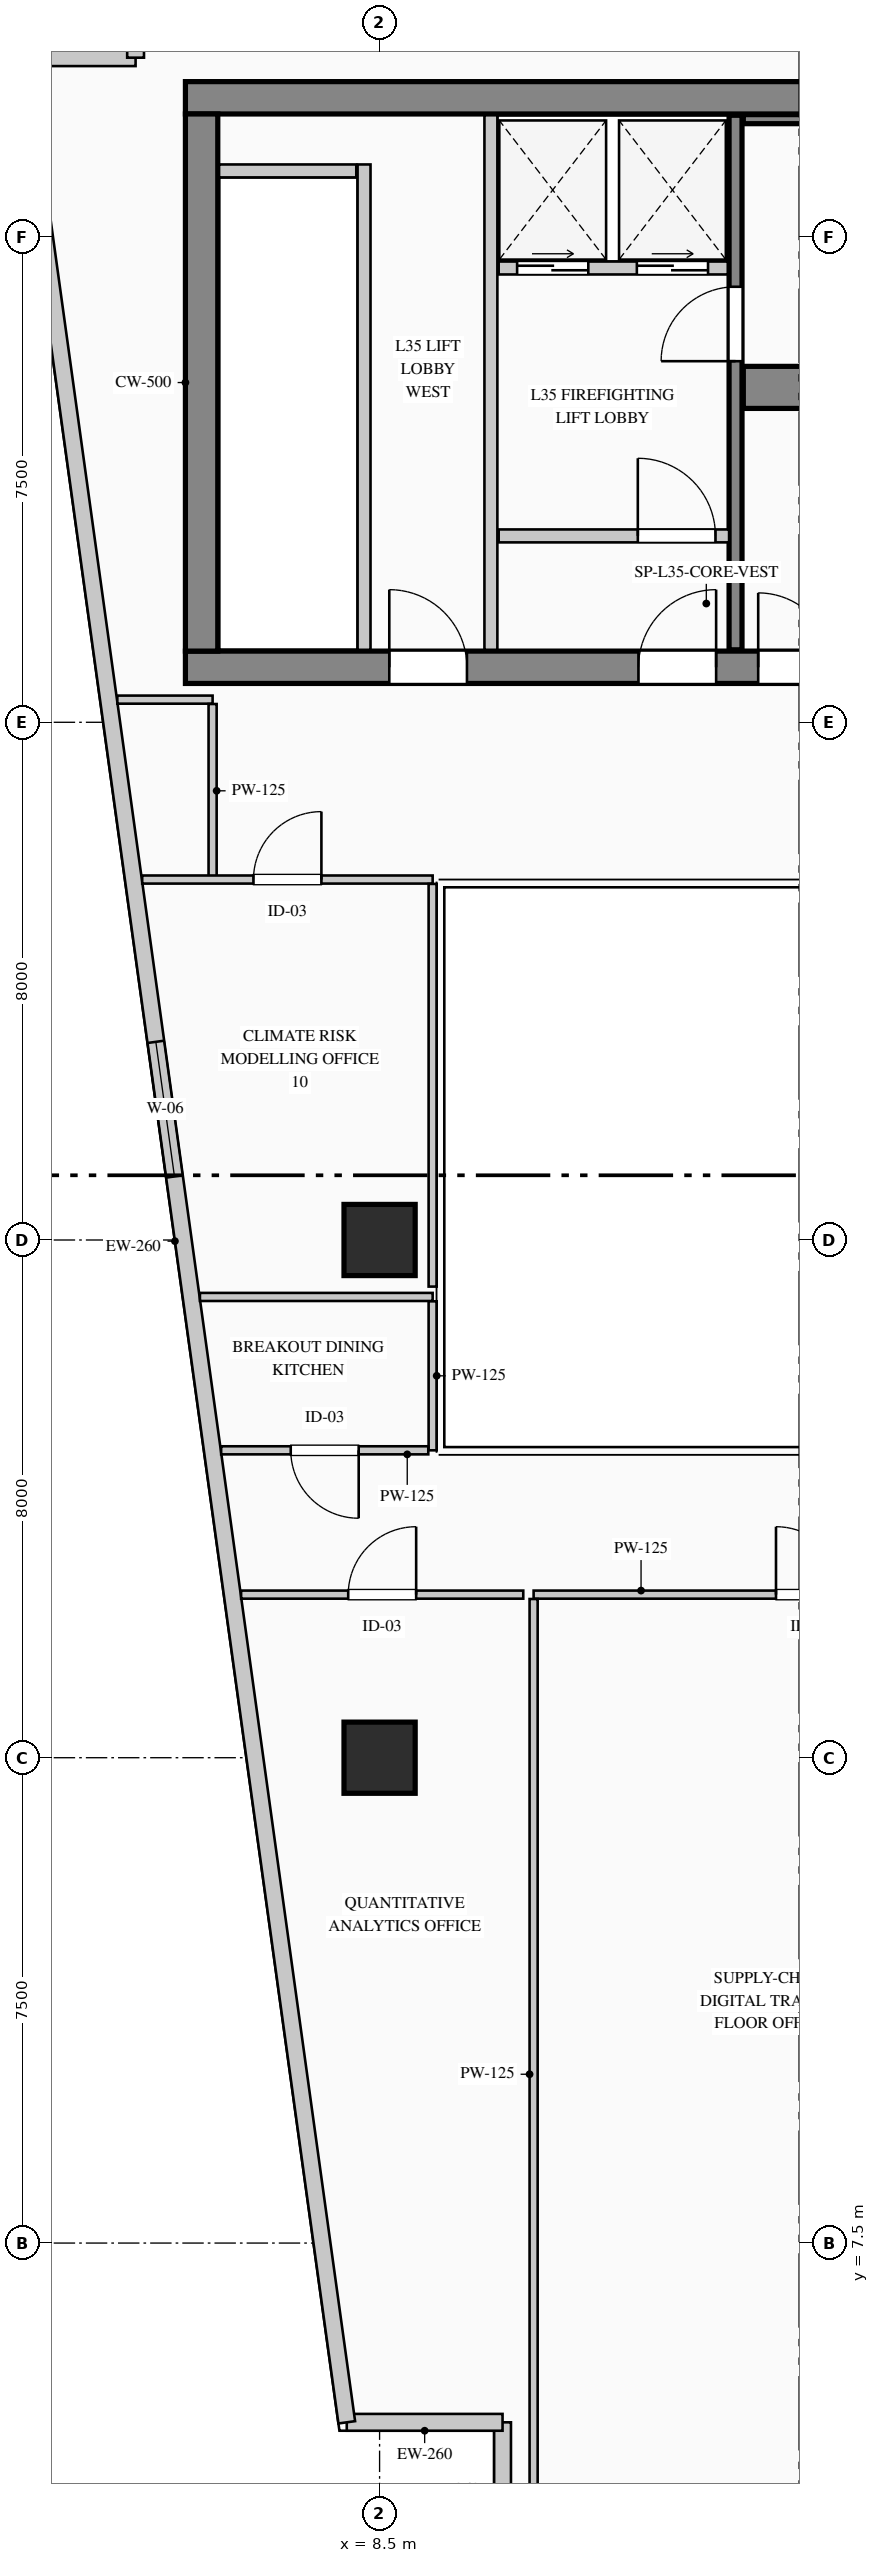
"""IFC4 building model, lengths in metres.
Left out: names, types, materials, properties, quantities, classifications, styles, units other than length and angle.
Written with IfcOpenShell. Run it as: python <this file> out.ifc"""

import sys

from ifc_helpers import new_model, si_unit, direction, frame, frame_2d, origin, origin_2d, place, context, subcontext, project, spatial, rectangle, extrude, element, fill, save


model = new_model("IFC4")
c1 = context("Model", 3, precision=1e-05, world=origin(), true_north=direction((0.0, 1.0)))
c2 = subcontext(c1, "Body", "Model", "MODEL_VIEW")
j1 = project(units=[si_unit("LENGTHUNIT", "METRE"), si_unit("PLANEANGLEUNIT", "RADIAN")], contexts=[c1])
p1 = place(None, origin())
s1 = spatial("IfcSite", under=j1, at=p1, CompositionType="ELEMENT")
p2 = place(p1, origin())
s2 = spatial("IfcBuilding", under=s1, at=p2, CompositionType="ELEMENT")
p3 = place(p2, frame((0.0, 0.0, 150.9)))
s3 = spatial("IfcBuildingStorey", under=s2, at=p3, CompositionType="ELEMENT", Elevation=150.9)
p4 = place(p3, frame((5.5, 40.65, 0.0), z_axis=(0.0, 0.0, 1.0), x_axis=(1.0, 0.0, 0.0)))
e1 = element("IfcWall", 1, at=p4, inside=s3, PredefinedType="SHEAR", context=c2, shape_type="SweptSolid", body=[
    extrude(rectangle(XDim=17.85, YDim=0.5, at=frame_2d((8.925, 0.0))), origin(), (0.0, 0.0, 1.0), 3.95),
])
p5 = place(p4, frame((15.945, 0.0, 0.0)))
e2 = element("IfcOpeningElement", 2, at=p5, cuts=e1, PredefinedType="OPENING", context=c2, shape_type="SweptSolid", body=[
    extrude(rectangle(XDim=1.18, YDim=2.25, at=frame_2d((0.59, 1.125))), frame((0.0, 0.26, 0.0), z_axis=(0.0, -1.0, 0.0), x_axis=(1.0, 0.0, 0.0)), (0.0, 0.0, 1.0), 0.52),
])
p6 = place(p3, frame((5.5, 31.85, 0.0), z_axis=(0.0, 0.0, 1.0), x_axis=(1.0, 0.0, 0.0)))
e3 = element("IfcWall", 3, at=p6, inside=s3, PredefinedType="SHEAR", context=c2, shape_type="SweptSolid", body=[
    extrude(rectangle(XDim=17.85, YDim=0.5, at=frame_2d((8.925, 0.0))), origin(), (0.0, 0.0, 1.0), 3.95),
])
p7 = place(p6, frame((3.15, 0.0, 0.0)))
e4 = element("IfcOpeningElement", 4, at=p7, cuts=e3, PredefinedType="OPENING", context=c2, shape_type="SweptSolid", body=[
    extrude(rectangle(XDim=1.2, YDim=2.2, at=frame_2d((0.6, 1.1))), frame((0.0, 0.26, 0.0), z_axis=(0.0, -1.0, 0.0), x_axis=(1.0, 0.0, 0.0)), (0.0, 0.0, 1.0), 0.52),
])
p8 = place(p6, frame((7.0, 0.0, 0.0)))
e5 = element("IfcOpeningElement", 5, at=p8, cuts=e3, PredefinedType="OPENING", context=c2, shape_type="SweptSolid", body=[
    extrude(rectangle(XDim=1.2, YDim=2.2, at=frame_2d((0.6, 1.1))), frame((0.0, 0.26, 0.0), z_axis=(0.0, -1.0, 0.0), x_axis=(1.0, 0.0, 0.0)), (0.0, 0.0, 1.0), 0.52),
])
p9 = place(p6, frame((8.85, 0.0, 0.0)))
e6 = element("IfcOpeningElement", 6, at=p9, cuts=e3, PredefinedType="OPENING", context=c2, shape_type="SweptSolid", body=[
    extrude(rectangle(XDim=1.15, YDim=2.2, at=frame_2d((0.575, 1.1))), frame((0.0, 0.26, 0.0), z_axis=(0.0, -1.0, 0.0), x_axis=(1.0, 0.0, 0.0)), (0.0, 0.0, 1.0), 0.52),
])
p10 = place(p6, frame((15.95, 0.0, 0.0)))
e7 = element("IfcOpeningElement", 7, at=p10, cuts=e3, PredefinedType="OPENING", context=c2, shape_type="SweptSolid", body=[
    extrude(rectangle(XDim=1.2, YDim=2.2, at=frame_2d((0.6, 1.1))), frame((0.0, 0.26, 0.0), z_axis=(0.0, -1.0, 0.0), x_axis=(1.0, 0.0, 0.0)), (0.0, 0.0, 1.0), 0.52),
])
p11 = place(p3, frame((5.75, 32.1, 0.0), z_axis=(0.0, 0.0, 1.0), x_axis=(0.0, 1.0, 0.0)))
e8 = element("IfcWall", 8, at=p11, inside=s3, PredefinedType="SHEAR", context=c2, shape_type="SweptSolid", body=[
    extrude(rectangle(XDim=8.3, YDim=0.5, at=frame_2d((4.15, 0.0))), origin(), (0.0, 0.0, 1.0), 3.95),
])
p12 = place(p3, frame((14.0, 32.12, 0.0), z_axis=(0.0, 0.0, 1.0), x_axis=(0.0, 1.0, 0.0)))
e9 = element("IfcWall", 9, at=p12, inside=s3, PredefinedType="SHEAR", context=c2, shape_type="SweptSolid", body=[
    extrude(rectangle(XDim=8.26, YDim=0.2, at=frame_2d((4.13, 0.0))), origin(), (0.0, 0.0, 1.0), 3.95),
])
p13 = place(p12, frame((4.46, 0.0, 0.0)))
e10 = element("IfcOpeningElement", 10, at=p13, cuts=e9, PredefinedType="OPENING", context=c2, shape_type="SweptSolid", body=[
    extrude(rectangle(XDim=1.15, YDim=2.2, at=frame_2d((0.575, 1.1))), frame((0.0, 0.11, 0.0), z_axis=(0.0, -1.0, 0.0), x_axis=(1.0, 0.0, 0.0)), (0.0, 0.0, 1.0), 0.22),
])
p14 = place(p3, frame((14.12, 36.175, 0.0), z_axis=(0.0, 0.0, 1.0), x_axis=(1.0, 0.0, 0.0)))
e11 = element("IfcWall", 11, at=p14, inside=s3, PredefinedType="SHEAR", context=c2, shape_type="SweptSolid", body=[
    extrude(rectangle(XDim=7.01, YDim=0.65, at=frame_2d((3.505, 0.0))), origin(), (0.0, 0.0, 1.0), 3.95),
])
p15 = place(p3, frame((14.12, 40.32, 0.0), z_axis=(0.0, 0.0, 1.0), x_axis=(1.0, 0.0, 0.0)))
e12 = element("IfcWall", 12, at=p15, inside=s3, PredefinedType="SHEAR", context=c2, shape_type="SweptSolid", body=[
    extrude(rectangle(XDim=7.01, YDim=0.14, at=frame_2d((3.505, 0.0))), origin(), (0.0, 0.0, 1.0), 3.95),
])
for number, where, z_axis, x_axis in (
    (13, (8.5, 15.0, 0.0), (0.0, 0.0, 1.0), (1.0, 0.0, 0.0)),
    (14, (8.5, 23.0, 0.0), (0.0, 0.0, 1.0), (1.0, 0.0, 0.0)),
):
    element("IfcColumn", number, at=place(p3, frame(where, z_axis=z_axis, x_axis=x_axis)), inside=s3, PredefinedType="COLUMN", context=c2, shape_type="SweptSolid", body=[
        extrude(rectangle(XDim=1.1, YDim=1.1, at=origin_2d()), origin(), (0.0, 0.0, 1.0), 3.95),
    ])
p16 = place(p3, frame((10.4, 2.63, 0.0), z_axis=(0.0, 0.0, 1.0), x_axis=(0.0, 1.0, 0.0)))
e15 = element("IfcWall", 15, at=p16, inside=s3, PredefinedType="STANDARD", context=c2, shape_type="SweptSolid", body=[
    extrude(rectangle(XDim=2.1, YDim=0.26, at=frame_2d((1.05, 0.0))), origin(), (0.0, 0.0, 1.0), 3.69),
])
p17 = place(p3, frame((10.4, 4.73, 0.0), z_axis=(0.0, 0.0, 1.0), x_axis=(-1.0, 0.0, 0.0)))
e16 = element("IfcWall", 16, at=p17, inside=s3, PredefinedType="STANDARD", context=c2, shape_type="SweptSolid", body=[
    extrude(rectangle(XDim=2.407, YDim=0.26, at=frame_2d((1.204, 0.0))), origin(), (0.0, 0.0, 1.0), 3.69),
])
p18 = place(p3, frame((7.993, 4.73, 0.0), z_axis=(0.0, 0.0, 1.0), x_axis=(-0.136989009016, 0.990572567462, 0.0)))
e17 = element("IfcWall", 17, at=p18, inside=s3, PredefinedType="STANDARD", context=c2, shape_type="SweptSolid", body=[
    extrude(rectangle(XDim=36.888, YDim=0.26, at=frame_2d((18.444, 0.0))), origin(), (0.0, 0.0, 1.0), 3.69),
])
p19 = place(p18, frame((19.435, 0.0, 0.9)))
e18 = element("IfcOpeningElement", 18, at=p19, cuts=e17, PredefinedType="OPENING", context=c2, shape_type="SweptSolid", body=[
    extrude(rectangle(XDim=2.1, YDim=2.0, at=frame_2d((1.05, 1.0))), frame((0.0, 0.14, 0.0), z_axis=(0.0, -1.0, 0.0), x_axis=(1.0, 0.0, 0.0)), (0.0, 0.0, 1.0), 0.28),
])
p20 = place(p3, frame((2.94, 41.27, 0.0), z_axis=(0.0, 0.0, 1.0), x_axis=(1.0, 0.0, 0.0)))
e19 = element("IfcWall", 19, at=p20, inside=s3, PredefinedType="STANDARD", context=c2, shape_type="SweptSolid", body=[
    extrude(rectangle(XDim=1.79, YDim=0.26, at=frame_2d((0.895, 0.0))), origin(), (0.0, 0.0, 1.0), 3.69),
])
p21 = place(p3, frame((4.73, 41.27, 0.0), z_axis=(0.0, 0.0, 1.0), x_axis=(0.0, 1.0, 0.0)))
e20 = element("IfcWall", 20, at=p21, inside=s3, PredefinedType="STANDARD", context=c2, shape_type="SweptSolid", body=[
    extrude(rectangle(XDim=2.1, YDim=0.26, at=frame_2d((1.05, 0.0))), origin(), (0.0, 0.0, 1.0), 3.69),
])
p22 = place(p3, frame((8.26, 32.12, 0.0), z_axis=(0.0, 0.0, 1.0), x_axis=(0.0, 1.0, 0.0)))
e21 = element("IfcWall", 21, at=p22, inside=s3, PredefinedType="PARTITIONING", context=c2, shape_type="SweptSolid", body=[
    extrude(rectangle(XDim=7.5, YDim=0.2, at=frame_2d((3.75, 0.0))), origin(), (0.0, 0.0, 1.0), 3.69),
])
p23 = place(p3, frame((6.02, 39.52, 0.0), z_axis=(0.0, 0.0, 1.0), x_axis=(1.0, 0.0, 0.0)))
e22 = element("IfcWall", 22, at=p23, inside=s3, PredefinedType="PARTITIONING", context=c2, shape_type="SweptSolid", body=[
    extrude(rectangle(XDim=2.12, YDim=0.2, at=frame_2d((1.06, 0.0))), origin(), (0.0, 0.0, 1.0), 3.69),
])
p24 = place(p3, frame((10.22, 32.12, 0.0), z_axis=(0.0, 0.0, 1.0), x_axis=(0.0, 1.0, 0.0)))
e23 = element("IfcWall", 23, at=p24, inside=s3, PredefinedType="PARTITIONING", context=c2, shape_type="SweptSolid", body=[
    extrude(rectangle(XDim=8.26, YDim=0.2, at=frame_2d((4.13, 0.0))), origin(), (0.0, 0.0, 1.0), 3.69),
])
p25 = place(p3, frame((10.34, 38.02, 0.0), z_axis=(0.0, 0.0, 1.0), x_axis=(1.0, 0.0, 0.0)))
e24 = element("IfcWall", 24, at=p25, inside=s3, PredefinedType="PARTITIONING", context=c2, shape_type="SweptSolid", body=[
    extrude(rectangle(XDim=3.54, YDim=0.2, at=frame_2d((1.77, 0.0))), origin(), (0.0, 0.0, 1.0), 3.69),
])
p26 = place(p25, frame((0.285, 0.0, 0.0)))
e25 = element("IfcOpeningElement", 25, at=p26, cuts=e24, PredefinedType="OPENING", context=c2, shape_type="SweptSolid", body=[
    extrude(rectangle(XDim=1.1, YDim=2.2, at=frame_2d((0.55, 1.1))), frame((0.0, 0.11, 0.0), z_axis=(0.0, -1.0, 0.0), x_axis=(1.0, 0.0, 0.0)), (0.0, 0.0, 1.0), 0.22),
])
p27 = place(p25, frame((2.135, 0.0, 0.0)))
e26 = element("IfcOpeningElement", 26, at=p27, cuts=e24, PredefinedType="OPENING", context=c2, shape_type="SweptSolid", body=[
    extrude(rectangle(XDim=1.1, YDim=2.2, at=frame_2d((0.55, 1.1))), frame((0.0, 0.11, 0.0), z_axis=(0.0, -1.0, 0.0), x_axis=(1.0, 0.0, 0.0)), (0.0, 0.0, 1.0), 0.22),
])
p28 = place(p3, frame((10.34, 33.88, 0.0), z_axis=(0.0, 0.0, 1.0), x_axis=(1.0, 0.0, 0.0)))
e27 = element("IfcWall", 27, at=p28, inside=s3, PredefinedType="PARTITIONING", context=c2, shape_type="SweptSolid", body=[
    extrude(rectangle(XDim=3.56, YDim=0.2, at=frame_2d((1.78, 0.0))), origin(), (0.0, 0.0, 1.0), 3.69),
])
p29 = place(p28, frame((2.15, 0.0, 0.0)))
e28 = element("IfcOpeningElement", 28, at=p29, cuts=e27, PredefinedType="OPENING", context=c2, shape_type="SweptSolid", body=[
    extrude(rectangle(XDim=1.2, YDim=2.2, at=frame_2d((0.6, 1.1))), frame((0.0, 0.11, 0.0), z_axis=(0.0, -1.0, 0.0), x_axis=(1.0, 0.0, 0.0)), (0.0, 0.0, 1.0), 0.22),
])
p30 = place(p3, frame((10.88, 17.52, 0.0), z_axis=(0.0, 0.0, 1.0), x_axis=(1.0, 0.0, 0.0)))
e29 = element("IfcWall", 29, at=p30, inside=s3, PredefinedType="PARTITIONING", context=c2, shape_type="SweptSolid", body=[
    extrude(rectangle(XDim=8.54, YDim=0.125, at=frame_2d((4.27, 0.0))), origin(), (0.0, 0.0, 1.0), 3.69),
])
p31 = place(p30, frame((3.745, 0.0, 0.0)))
e30 = element("IfcOpeningElement", 30, at=p31, cuts=e29, PredefinedType="OPENING", context=c2, shape_type="SweptSolid", body=[
    extrude(rectangle(XDim=1.05, YDim=2.15, at=frame_2d((0.525, 1.075))), frame((0.0, 0.073, 0.0), z_axis=(0.0, -1.0, 0.0), x_axis=(1.0, 0.0, 0.0)), (0.0, 0.0, 1.0), 0.145),
])
p32 = place(p3, frame((10.88, 2.765, 0.0), z_axis=(0.0, 0.0, 1.0), x_axis=(0.0, 1.0, 0.0)))
e31 = element("IfcWall", 31, at=p32, inside=s3, PredefinedType="PARTITIONING", context=c2, shape_type="SweptSolid", body=[
    extrude(rectangle(XDim=14.688, YDim=0.125, at=frame_2d((7.344, 0.0))), origin(), (0.0, 0.0, 1.0), 3.69),
])
p33 = place(p3, frame((6.36, 17.52, 0.0), z_axis=(0.0, 0.0, 1.0), x_axis=(1.0, 0.0, 0.0)))
e32 = element("IfcWall", 32, at=p33, inside=s3, PredefinedType="PARTITIONING", context=c2, shape_type="SweptSolid", body=[
    extrude(rectangle(XDim=4.36, YDim=0.125, at=frame_2d((2.18, 0.0))), origin(), (0.0, 0.0, 1.0), 3.69),
])
p34 = place(p33, frame((1.655, 0.0, 0.0)))
e33 = element("IfcOpeningElement", 33, at=p34, cuts=e32, PredefinedType="OPENING", context=c2, shape_type="SweptSolid", body=[
    extrude(rectangle(XDim=1.05, YDim=2.15, at=frame_2d((0.525, 1.075))), frame((0.0, 0.073, 0.0), z_axis=(0.0, -1.0, 0.0), x_axis=(1.0, 0.0, 0.0)), (0.0, 0.0, 1.0), 0.145),
])
p35 = place(p3, frame((5.724, 22.12, 0.0), z_axis=(0.0, 0.0, 1.0), x_axis=(1.0, 0.0, 0.0)))
e34 = element("IfcWall", 34, at=p35, inside=s3, PredefinedType="PARTITIONING", context=c2, shape_type="SweptSolid", body=[
    extrude(rectangle(XDim=3.596, YDim=0.125, at=frame_2d((1.798, 0.0))), origin(), (0.0, 0.0, 1.0), 3.69),
])
p36 = place(p3, frame((9.32, 22.052, 0.0), z_axis=(0.0, 0.0, 1.0), x_axis=(0.0, -1.0, 0.0)))
e35 = element("IfcWall", 35, at=p36, inside=s3, PredefinedType="PARTITIONING", context=c2, shape_type="SweptSolid", body=[
    extrude(rectangle(XDim=2.302, YDim=0.125, at=frame_2d((1.151, 0.0))), origin(), (0.0, 0.0, 1.0), 3.315),
])
p37 = place(p3, frame((9.252, 19.75, 0.0), z_axis=(0.0, 0.0, 1.0), x_axis=(-1.0, 0.0, 0.0)))
e36 = element("IfcWall", 36, at=p37, inside=s3, PredefinedType="PARTITIONING", context=c2, shape_type="SweptSolid", body=[
    extrude(rectangle(XDim=3.2, YDim=0.125, at=frame_2d((1.6, 0.0))), origin(), (0.0, 0.0, 1.0), 3.69),
])
p38 = place(p37, frame((1.075, 0.0, 0.0)))
e37 = element("IfcOpeningElement", 37, at=p38, cuts=e36, PredefinedType="OPENING", context=c2, shape_type="SweptSolid", body=[
    extrude(rectangle(XDim=1.05, YDim=2.15, at=frame_2d((0.525, 1.075))), frame((0.0, 0.073, 0.0), z_axis=(0.0, -1.0, 0.0), x_axis=(1.0, 0.0, 0.0)), (0.0, 0.0, 1.0), 0.145),
])
p39 = place(p3, frame((4.448, 31.35, 0.0), z_axis=(0.0, 0.0, 1.0), x_axis=(1.0, 0.0, 0.0)))
e38 = element("IfcWall", 38, at=p39, inside=s3, PredefinedType="PARTITIONING", context=c2, shape_type="SweptSolid", body=[
    extrude(rectangle(XDim=1.472, YDim=0.125, at=frame_2d((0.736, 0.0))), origin(), (0.0, 0.0, 1.0), 3.69),
])
p40 = place(p3, frame((5.92, 31.282, 0.0), z_axis=(0.0, 0.0, 1.0), x_axis=(0.0, -1.0, 0.0)))
e39 = element("IfcWall", 39, at=p40, inside=s3, PredefinedType="PARTITIONING", context=c2, shape_type="SweptSolid", body=[
    extrude(rectangle(XDim=2.682, YDim=0.125, at=frame_2d((1.341, 0.0))), origin(), (0.0, 0.0, 1.0), 3.69),
])
p41 = place(p3, frame((4.832, 28.57, 0.0), z_axis=(0.0, 0.0, 1.0), x_axis=(1.0, 0.0, 0.0)))
e40 = element("IfcWall", 40, at=p41, inside=s3, PredefinedType="PARTITIONING", context=c2, shape_type="SweptSolid", body=[
    extrude(rectangle(XDim=4.488, YDim=0.125, at=frame_2d((2.244, 0.0))), origin(), (0.0, 0.0, 1.0), 3.69),
])
p42 = place(p41, frame((1.719, 0.0, 0.0)))
e41 = element("IfcOpeningElement", 41, at=p42, cuts=e40, PredefinedType="OPENING", context=c2, shape_type="SweptSolid", body=[
    extrude(rectangle(XDim=1.05, YDim=2.15, at=frame_2d((0.525, 1.075))), frame((0.0, 0.073, 0.0), z_axis=(0.0, -1.0, 0.0), x_axis=(1.0, 0.0, 0.0)), (0.0, 0.0, 1.0), 0.145),
])
p43 = place(p3, frame((9.32, 28.502, 0.0), z_axis=(0.0, 0.0, 1.0), x_axis=(0.0, -1.0, 0.0)))
e42 = element("IfcWall", 42, at=p43, inside=s3, PredefinedType="PARTITIONING", context=c2, shape_type="SweptSolid", body=[
    extrude(rectangle(XDim=6.222, YDim=0.125, at=frame_2d((3.111, 0.0))), origin(), (0.0, 0.0, 1.0), 3.315),
])
p44 = place(p19, origin())
e43 = element("IfcWindow", 43, at=p44, inside=s3, PartitioningType="DOUBLE_PANEL_VERTICAL", PredefinedType="WINDOW", context=c2, shape_type="SweptSolid", body=[
    extrude(rectangle(XDim=2.1, YDim=2.0, at=frame_2d((1.05, 1.0))), frame((0.0, 0.03, 0.0), z_axis=(0.0, -1.0, 0.0), x_axis=(1.0, 0.0, 0.0)), (0.0, 0.0, 1.0), 0.06),
])
fill(e18, e43)
p45 = place(p7, origin())
e44 = element("IfcDoor", 44, at=p45, inside=s3, OperationType="SINGLE_SWING_LEFT", PredefinedType="DOOR", context=c2, shape_type="SweptSolid", body=[
    extrude(rectangle(XDim=1.2, YDim=2.2, at=frame_2d((0.6, 1.1))), frame((0.0, 0.025, 0.0), z_axis=(0.0, -1.0, 0.0), x_axis=(1.0, 0.0, 0.0)), (0.0, 0.0, 1.0), 0.05),
])
fill(e4, e44)
p46 = place(p8, origin())
e45 = element("IfcDoor", 45, at=p46, inside=s3, OperationType="SINGLE_SWING_RIGHT", PredefinedType="DOOR", context=c2, shape_type="SweptSolid", body=[
    extrude(rectangle(XDim=1.2, YDim=2.2, at=frame_2d((0.6, 1.1))), frame((0.0, 0.025, 0.0), z_axis=(0.0, -1.0, 0.0), x_axis=(1.0, 0.0, 0.0)), (0.0, 0.0, 1.0), 0.05),
])
fill(e5, e45)
p47 = place(p9, origin())
e46 = element("IfcDoor", 46, at=p47, inside=s3, OperationType="SINGLE_SWING_LEFT", PredefinedType="DOOR", context=c2, shape_type="SweptSolid", body=[
    extrude(rectangle(XDim=1.15, YDim=2.2, at=frame_2d((0.575, 1.1))), frame((0.0, 0.025, 0.0), z_axis=(0.0, -1.0, 0.0), x_axis=(1.0, 0.0, 0.0)), (0.0, 0.0, 1.0), 0.05),
])
fill(e6, e46)
p48 = place(p29, origin())
e47 = element("IfcDoor", 47, at=p48, inside=s3, OperationType="SINGLE_SWING_LEFT", PredefinedType="DOOR", context=c2, shape_type="SweptSolid", body=[
    extrude(rectangle(XDim=1.2, YDim=2.2, at=frame_2d((0.6, 1.1))), frame((0.0, 0.025, 0.0), z_axis=(0.0, -1.0, 0.0), x_axis=(1.0, 0.0, 0.0)), (0.0, 0.0, 1.0), 0.05),
])
fill(e28, e47)
p49 = place(p13, origin())
e48 = element("IfcDoor", 48, at=p49, inside=s3, OperationType="SINGLE_SWING_LEFT", PredefinedType="DOOR", context=c2, shape_type="SweptSolid", body=[
    extrude(rectangle(XDim=1.15, YDim=2.2, at=frame_2d((0.575, 1.1))), frame((0.0, 0.025, 0.0), z_axis=(0.0, -1.0, 0.0), x_axis=(1.0, 0.0, 0.0)), (0.0, 0.0, 1.0), 0.05),
])
fill(e10, e48)
p50 = place(p26, origin())
e49 = element("IfcDoor", 49, at=p50, inside=s3, OperationType="DOUBLE_DOOR_SLIDING", PredefinedType="DOOR", context=c2, shape_type="SweptSolid", body=[
    extrude(rectangle(XDim=1.1, YDim=2.2, at=frame_2d((0.55, 1.1))), frame((0.0, 0.025, 0.0), z_axis=(0.0, -1.0, 0.0), x_axis=(1.0, 0.0, 0.0)), (0.0, 0.0, 1.0), 0.05),
])
fill(e25, e49)
p51 = place(p27, origin())
e50 = element("IfcDoor", 50, at=p51, inside=s3, OperationType="DOUBLE_DOOR_SLIDING", PredefinedType="DOOR", context=c2, shape_type="SweptSolid", body=[
    extrude(rectangle(XDim=1.1, YDim=2.2, at=frame_2d((0.55, 1.1))), frame((0.0, 0.025, 0.0), z_axis=(0.0, -1.0, 0.0), x_axis=(1.0, 0.0, 0.0)), (0.0, 0.0, 1.0), 0.05),
])
fill(e26, e50)
p52 = place(p31, origin())
e51 = element("IfcDoor", 51, at=p52, inside=s3, OperationType="SINGLE_SWING_LEFT", PredefinedType="DOOR", context=c2, shape_type="SweptSolid", body=[
    extrude(rectangle(XDim=1.05, YDim=2.15, at=frame_2d((0.525, 1.075))), frame((0.0, 0.025, 0.0), z_axis=(0.0, -1.0, 0.0), x_axis=(1.0, 0.0, 0.0)), (0.0, 0.0, 1.0), 0.05),
])
fill(e30, e51)
p53 = place(p34, origin())
e52 = element("IfcDoor", 52, at=p53, inside=s3, OperationType="SINGLE_SWING_RIGHT", PredefinedType="DOOR", context=c2, shape_type="SweptSolid", body=[
    extrude(rectangle(XDim=1.05, YDim=2.15, at=frame_2d((0.525, 1.075))), frame((0.0, 0.025, 0.0), z_axis=(0.0, -1.0, 0.0), x_axis=(1.0, 0.0, 0.0)), (0.0, 0.0, 1.0), 0.05),
])
fill(e33, e52)
p54 = place(p38, origin())
e53 = element("IfcDoor", 53, at=p54, inside=s3, OperationType="SINGLE_SWING_LEFT", PredefinedType="DOOR", context=c2, shape_type="SweptSolid", body=[
    extrude(rectangle(XDim=1.05, YDim=2.15, at=frame_2d((0.525, 1.075))), frame((0.0, 0.025, 0.0), z_axis=(0.0, -1.0, 0.0), x_axis=(1.0, 0.0, 0.0)), (0.0, 0.0, 1.0), 0.05),
])
fill(e37, e53)
p55 = place(p42, origin())
e54 = element("IfcDoor", 54, at=p55, inside=s3, OperationType="SINGLE_SWING_RIGHT", PredefinedType="DOOR", context=c2, shape_type="SweptSolid", body=[
    extrude(rectangle(XDim=1.05, YDim=2.15, at=frame_2d((0.525, 1.075))), frame((0.0, 0.025, 0.0), z_axis=(0.0, -1.0, 0.0), x_axis=(1.0, 0.0, 0.0)), (0.0, 0.0, 1.0), 0.05),
])
fill(e41, e54)
save(model, sys.argv[1])
